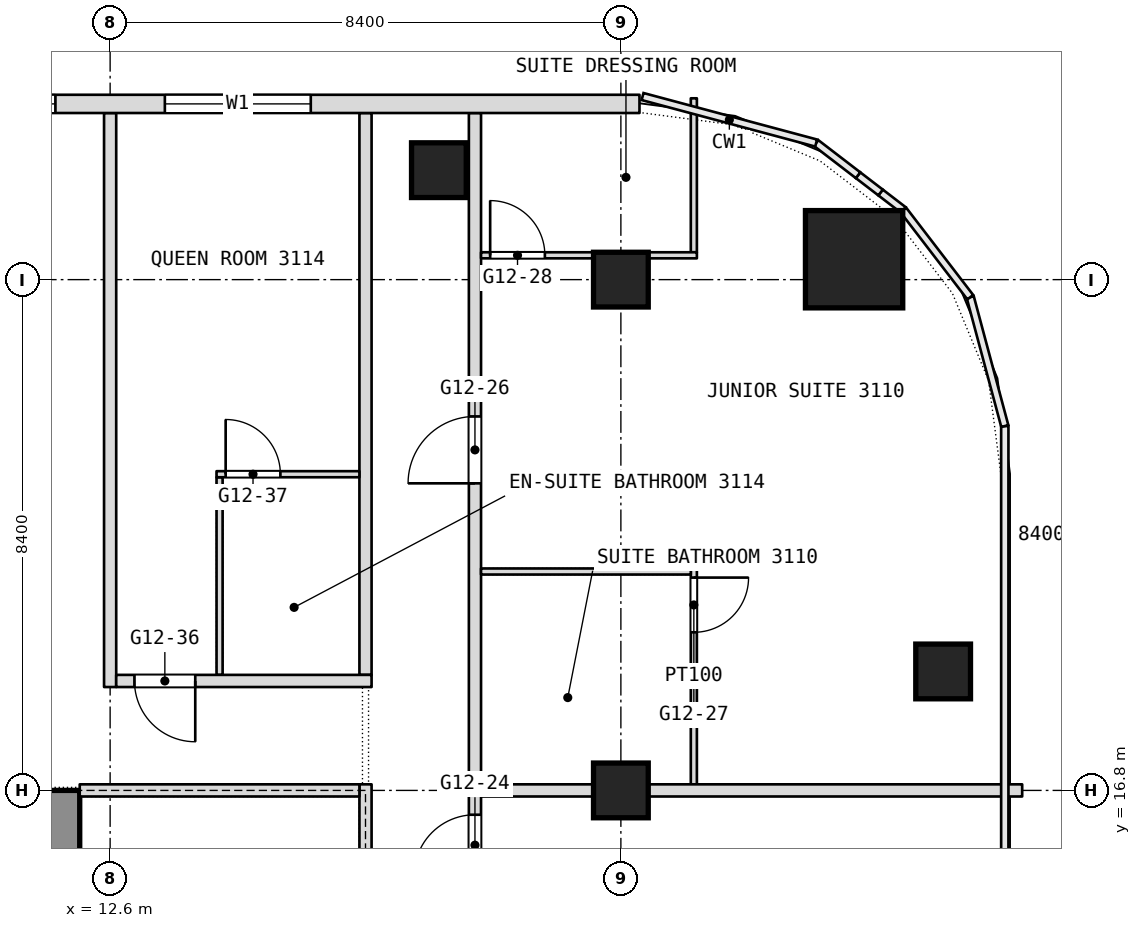
"""IFC4 building model, lengths in metres.
Left out: names, types, materials, properties, quantities, classifications, styles, units other than length and angle.
Written with IfcOpenShell. Run it as: python <this file> out.ifc"""

import sys

from ifc_helpers import new_model, si_unit, direction, frame, frame_2d, origin, origin_2d, place, context, subcontext, project, spatial, rectangle, extrude, element, fill, save


model = new_model("IFC4")
c1 = context("Model", 3, precision=1e-05, world=origin(), true_north=direction((0.0, 1.0)))
c2 = subcontext(c1, "Body", "Model", "MODEL_VIEW")
j1 = project(units=[si_unit("LENGTHUNIT", "METRE"), si_unit("PLANEANGLEUNIT", "RADIAN")], contexts=[c1])
p1 = place(None, origin())
s1 = spatial("IfcSite", under=j1, at=p1, CompositionType="ELEMENT")
p2 = place(p1, origin())
s2 = spatial("IfcBuilding", under=s1, at=p2, CompositionType="ELEMENT")
p3 = place(p2, frame((0.0, 0.0, 137.3)))
s3 = spatial("IfcBuildingStorey", under=s2, at=p3, CompositionType="ELEMENT", Elevation=137.3)
p4 = place(p3, frame((11.6, 0.0, 0.0), z_axis=(0.0, 0.0, 1.0), x_axis=(0.0, 1.0, 0.0)))
e1 = element("IfcWall", 1, at=p4, inside=s3, PredefinedType="SHEAR", context=c2, shape_type="SweptSolid", body=[
    extrude(rectangle(XDim=16.8, YDim=1.0, at=frame_2d((8.4, 0.0))), origin(), (0.0, 0.0, 1.0), 3.6),
])
p5 = place(p4, frame((2.3, 0.0, 0.0)))
e2 = element("IfcOpeningElement", 2, at=p5, cuts=e1, PredefinedType="OPENING", context=c2, shape_type="SweptSolid", body=[
    extrude(rectangle(XDim=1.1, YDim=2.1, at=frame_2d((0.55, 1.05))), frame((0.0, 0.5, 0.0), z_axis=(0.0, -1.0, 0.0), x_axis=(1.0, 0.0, 0.0)), (0.0, 0.0, 1.0), 1.0),
])
p6 = place(p4, frame((4.85, 0.0, 0.0)))
e3 = element("IfcOpeningElement", 3, at=p6, cuts=e1, PredefinedType="OPENING", context=c2, shape_type="SweptSolid", body=[
    extrude(rectangle(XDim=1.1, YDim=2.1, at=frame_2d((0.55, 1.05))), frame((0.0, 0.5, 0.0), z_axis=(0.0, -1.0, 0.0), x_axis=(1.0, 0.0, 0.0)), (0.0, 0.0, 1.0), 1.0),
])
p7 = place(p4, frame((6.825, 0.0, 0.0)))
e4 = element("IfcOpeningElement", 4, at=p7, cuts=e1, PredefinedType="OPENING", context=c2, shape_type="SweptSolid", body=[
    extrude(rectangle(XDim=1.2, YDim=2.1, at=frame_2d((0.6, 1.05))), frame((0.0, 0.5, 0.0), z_axis=(0.0, -1.0, 0.0), x_axis=(1.0, 0.0, 0.0)), (0.0, 0.0, 1.0), 1.0),
])
p8 = place(p4, frame((13.4, 0.0, 0.0)))
e5 = element("IfcOpeningElement", 5, at=p8, cuts=e1, PredefinedType="OPENING", context=c2, shape_type="SweptSolid", body=[
    extrude(rectangle(XDim=1.1, YDim=2.1, at=frame_2d((0.55, 1.05))), frame((0.0, 0.5, 0.0), z_axis=(0.0, -1.0, 0.0), x_axis=(1.0, 0.0, 0.0)), (0.0, 0.0, 1.0), 1.0),
])
p9 = place(p4, frame((10.85, 0.0, 0.0)))
e6 = element("IfcOpeningElement", 6, at=p9, cuts=e1, PredefinedType="OPENING", context=c2, shape_type="SweptSolid", body=[
    extrude(rectangle(XDim=1.1, YDim=2.1, at=frame_2d((0.55, 1.05))), frame((0.0, 0.5, 0.0), z_axis=(0.0, -1.0, 0.0), x_axis=(1.0, 0.0, 0.0)), (0.0, 0.0, 1.0), 1.0),
])
p10 = place(p4, frame((8.775, 0.0, 0.0)))
e7 = element("IfcOpeningElement", 7, at=p10, cuts=e1, PredefinedType="OPENING", context=c2, shape_type="SweptSolid", body=[
    extrude(rectangle(XDim=1.2, YDim=2.1, at=frame_2d((0.6, 1.05))), frame((0.0, 0.5, 0.0), z_axis=(0.0, -1.0, 0.0), x_axis=(1.0, 0.0, 0.0)), (0.0, 0.0, 1.0), 1.0),
])
p11 = place(p3, frame((24.835, 25.535, 0.0), z_axis=(0.0, 0.0, 1.0), x_axis=(1.0, 0.0, 0.0)))
e8 = element("IfcColumn", 8, at=p11, inside=s3, PredefinedType="COLUMN", context=c2, shape_type="SweptSolid", body=[
    extrude(rectangle(XDim=1.6, YDim=1.6, at=origin_2d()), origin(), (0.0, 0.0, 1.0), 3.6),
])
for number, where, z_axis, x_axis in (
    (9, (21.0, 16.8, 0.0), (0.0, 0.0, 1.0), (1.0, 0.0, 0.0)),
    (10, (21.0, 25.2, 0.0), (0.0, 0.0, 1.0), (1.0, 0.0, 0.0)),
    (11, (18.007, 27.0, 0.0), (0.0, 0.0, 1.0), (1.0, 0.0, 0.0)),
    (12, (26.3, 18.756, 0.0), (0.0, 0.0, 1.0), (1.0, 0.0, 0.0)),
):
    element("IfcColumn", number, at=place(p3, frame(where, z_axis=z_axis, x_axis=x_axis)), inside=s3, PredefinedType="COLUMN", context=c2, shape_type="SweptSolid", body=[
        extrude(rectangle(XDim=0.9, YDim=0.9, at=origin_2d()), origin(), (0.0, 0.0, 1.0), 3.6),
    ])
p12 = place(p3, frame((22.2, 16.9, 0.0), z_axis=(0.0, 0.0, 1.0), x_axis=(0.0, 1.0, 0.0)))
e13 = element("IfcWall", 13, at=p12, inside=s3, PredefinedType="PARTITIONING", context=c2, shape_type="SweptSolid", body=[
    extrude(rectangle(XDim=3.55, YDim=0.1, at=frame_2d((1.775, 0.0))), origin(), (0.0, 0.0, 1.0), 3.34),
])
p13 = place(p12, frame((2.5, 0.0, 0.0)))
e14 = element("IfcOpeningElement", 14, at=p13, cuts=e13, PredefinedType="OPENING", context=c2, shape_type="SweptSolid", body=[
    extrude(rectangle(XDim=0.9, YDim=2.1, at=frame_2d((0.45, 1.05))), frame((0.0, 0.05, 0.0), z_axis=(0.0, -1.0, 0.0), x_axis=(1.0, 0.0, 0.0)), (0.0, 0.0, 1.0), 0.1),
])
p14 = place(p3, frame((22.2, 25.65, 0.0), z_axis=(0.0, 0.0, 1.0), x_axis=(0.0, 1.0, 0.0)))
e15 = element("IfcWall", 15, at=p14, inside=s3, PredefinedType="PARTITIONING", context=c2, shape_type="SweptSolid", body=[
    extrude(rectangle(XDim=2.532, YDim=0.1, at=frame_2d((1.266, 0.0))), origin(), (0.0, 0.0, 1.0), 3.34),
])
p15 = place(p3, frame((18.6, -21.708, 0.0), z_axis=(0.0, 0.0, 1.0), x_axis=(0.0, 1.0, 0.0)))
e16 = element("IfcWall", 16, at=p15, inside=s3, PredefinedType="PARTITIONING", context=c2, shape_type="SweptSolid", body=[
    extrude(rectangle(XDim=49.648, YDim=0.2, at=frame_2d((24.824, 0.0))), origin(), (0.0, 0.0, 1.0), 3.34),
])
p16 = place(p15, frame((2.8, 0.0, 0.0)))
e17 = element("IfcOpeningElement", 17, at=p16, cuts=e16, PredefinedType="OPENING", context=c2, shape_type="SweptSolid", body=[
    extrude(rectangle(XDim=1.0, YDim=2.1, at=frame_2d((0.5, 1.05))), frame((0.0, 0.1, 0.0), z_axis=(0.0, -1.0, 0.0), x_axis=(1.0, 0.0, 0.0)), (0.0, 0.0, 1.0), 0.2),
])
p17 = place(p15, frame((7.708, 0.0, 0.0)))
e18 = element("IfcOpeningElement", 18, at=p17, cuts=e16, PredefinedType="OPENING", context=c2, shape_type="SweptSolid", body=[
    extrude(rectangle(XDim=1.0, YDim=2.1, at=frame_2d((0.5, 1.05))), frame((0.0, 0.1, 0.0), z_axis=(0.0, -1.0, 0.0), x_axis=(1.0, 0.0, 0.0)), (0.0, 0.0, 1.0), 0.2),
])
p18 = place(p15, frame((9.508, 0.0, 0.0)))
e19 = element("IfcOpeningElement", 19, at=p18, cuts=e16, PredefinedType="OPENING", context=c2, shape_type="SweptSolid", body=[
    extrude(rectangle(XDim=1.0, YDim=2.1, at=frame_2d((0.5, 1.05))), frame((0.0, 0.1, 0.0), z_axis=(0.0, -1.0, 0.0), x_axis=(1.0, 0.0, 0.0)), (0.0, 0.0, 1.0), 0.2),
])
p19 = place(p15, frame((13.708, 0.0, 0.0)))
e20 = element("IfcOpeningElement", 20, at=p19, cuts=e16, PredefinedType="OPENING", context=c2, shape_type="SweptSolid", body=[
    extrude(rectangle(XDim=1.0, YDim=2.1, at=frame_2d((0.5, 1.05))), frame((0.0, 0.1, 0.0), z_axis=(0.0, -1.0, 0.0), x_axis=(1.0, 0.0, 0.0)), (0.0, 0.0, 1.0), 0.2),
])
p20 = place(p15, frame((20.308, 0.0, 0.0)))
e21 = element("IfcOpeningElement", 21, at=p20, cuts=e16, PredefinedType="OPENING", context=c2, shape_type="SweptSolid", body=[
    extrude(rectangle(XDim=1.0, YDim=2.1, at=frame_2d((0.5, 1.05))), frame((0.0, 0.1, 0.0), z_axis=(0.0, -1.0, 0.0), x_axis=(1.0, 0.0, 0.0)), (0.0, 0.0, 1.0), 0.2),
])
p21 = place(p15, frame((24.508, 0.0, 0.0)))
e22 = element("IfcOpeningElement", 22, at=p21, cuts=e16, PredefinedType="OPENING", context=c2, shape_type="SweptSolid", body=[
    extrude(rectangle(XDim=1.0, YDim=2.1, at=frame_2d((0.5, 1.05))), frame((0.0, 0.1, 0.0), z_axis=(0.0, -1.0, 0.0), x_axis=(1.0, 0.0, 0.0)), (0.0, 0.0, 1.0), 0.2),
])
p22 = place(p15, frame((26.308, 0.0, 0.0)))
e23 = element("IfcOpeningElement", 23, at=p22, cuts=e16, PredefinedType="OPENING", context=c2, shape_type="SweptSolid", body=[
    extrude(rectangle(XDim=1.0, YDim=2.1, at=frame_2d((0.5, 1.05))), frame((0.0, 0.1, 0.0), z_axis=(0.0, -1.0, 0.0), x_axis=(1.0, 0.0, 0.0)), (0.0, 0.0, 1.0), 0.2),
])
p23 = place(p15, frame((30.508, 0.0, 0.0)))
e24 = element("IfcOpeningElement", 24, at=p23, cuts=e16, PredefinedType="OPENING", context=c2, shape_type="SweptSolid", body=[
    extrude(rectangle(XDim=1.0, YDim=2.1, at=frame_2d((0.5, 1.05))), frame((0.0, 0.1, 0.0), z_axis=(0.0, -1.0, 0.0), x_axis=(1.0, 0.0, 0.0)), (0.0, 0.0, 1.0), 0.2),
])
p24 = place(p15, frame((37.108, 0.0, 0.0)))
e25 = element("IfcOpeningElement", 25, at=p24, cuts=e16, PredefinedType="OPENING", context=c2, shape_type="SweptSolid", body=[
    extrude(rectangle(XDim=1.0, YDim=2.1, at=frame_2d((0.5, 1.05))), frame((0.0, 0.1, 0.0), z_axis=(0.0, -1.0, 0.0), x_axis=(1.0, 0.0, 0.0)), (0.0, 0.0, 1.0), 0.2),
])
p25 = place(p15, frame((43.558, 0.0, 0.0)))
e26 = element("IfcOpeningElement", 26, at=p25, cuts=e16, PredefinedType="OPENING", context=c2, shape_type="SweptSolid", body=[
    extrude(rectangle(XDim=1.1, YDim=2.1, at=frame_2d((0.55, 1.05))), frame((0.0, 0.1, 0.0), z_axis=(0.0, -1.0, 0.0), x_axis=(1.0, 0.0, 0.0)), (0.0, 0.0, 1.0), 0.2),
])
p26 = place(p3, frame((16.8, 18.7, 0.0), z_axis=(0.0, 0.0, 1.0), x_axis=(0.0, 1.0, 0.0)))
e27 = element("IfcWall", 27, at=p26, inside=s3, PredefinedType="PARTITIONING", context=c2, shape_type="SweptSolid", body=[
    extrude(rectangle(XDim=9.24, YDim=0.2, at=frame_2d((4.62, 0.0))), origin(), (0.0, 0.0, 1.0), 3.34),
])
p27 = place(p3, frame((14.4, 18.7, 0.0), z_axis=(0.0, 0.0, 1.0), x_axis=(0.0, 1.0, 0.0)))
e28 = element("IfcWall", 28, at=p27, inside=s3, PredefinedType="PARTITIONING", context=c2, shape_type="SweptSolid", body=[
    extrude(rectangle(XDim=3.25, YDim=0.1, at=frame_2d((1.625, 0.0))), origin(), (0.0, 0.0, 1.0), 3.34),
])
p28 = place(p3, frame((12.6, 18.5, 0.0), z_axis=(0.0, 0.0, 1.0), x_axis=(0.0, 1.0, 0.0)))
e29 = element("IfcWall", 29, at=p28, inside=s3, PredefinedType="PARTITIONING", context=c2, shape_type="SweptSolid", body=[
    extrude(rectangle(XDim=9.44, YDim=0.2, at=frame_2d((4.72, 0.0))), origin(), (0.0, 0.0, 1.0), 3.34),
])
p29 = place(p3, frame((18.7, 16.8, 0.0), z_axis=(0.0, 0.0, 1.0), x_axis=(1.0, 0.0, 0.0)))
e30 = element("IfcWall", 30, at=p29, inside=s3, PredefinedType="PARTITIONING", context=c2, shape_type="SweptSolid", body=[
    extrude(rectangle(XDim=8.9, YDim=0.2, at=frame_2d((4.45, 0.0))), origin(), (0.0, 0.0, 1.0), 2.89),
])
p30 = place(p3, frame((12.7, 18.6, 0.0), z_axis=(0.0, 0.0, 1.0), x_axis=(1.0, 0.0, 0.0)))
e31 = element("IfcWall", 31, at=p30, inside=s3, PredefinedType="PARTITIONING", context=c2, shape_type="SweptSolid", body=[
    extrude(rectangle(XDim=4.2, YDim=0.2, at=frame_2d((2.1, 0.0))), origin(), (0.0, 0.0, 1.0), 3.34),
])
p31 = place(p30, frame((0.3, 0.0, 0.0)))
e32 = element("IfcOpeningElement", 32, at=p31, cuts=e31, PredefinedType="OPENING", context=c2, shape_type="SweptSolid", body=[
    extrude(rectangle(XDim=1.0, YDim=2.1, at=frame_2d((0.5, 1.05))), frame((0.0, 0.1, 0.0), z_axis=(0.0, -1.0, 0.0), x_axis=(1.0, 0.0, 0.0)), (0.0, 0.0, 1.0), 0.2),
])
p32 = place(p3, frame((18.7, 20.4, 0.0), z_axis=(0.0, 0.0, 1.0), x_axis=(1.0, 0.0, 0.0)))
e33 = element("IfcWall", 33, at=p32, inside=s3, PredefinedType="PARTITIONING", context=c2, shape_type="SweptSolid", body=[
    extrude(rectangle(XDim=3.45, YDim=0.1, at=frame_2d((1.725, 0.0))), origin(), (0.0, 0.0, 1.0), 3.34),
])
p33 = place(p3, frame((14.35, 22.0, 0.0), z_axis=(0.0, 0.0, 1.0), x_axis=(1.0, 0.0, 0.0)))
e34 = element("IfcWall", 34, at=p33, inside=s3, PredefinedType="PARTITIONING", context=c2, shape_type="SweptSolid", body=[
    extrude(rectangle(XDim=2.35, YDim=0.1, at=frame_2d((1.175, 0.0))), origin(), (0.0, 0.0, 1.0), 3.34),
])
p34 = place(p33, frame((0.15, 0.0, 0.0)))
e35 = element("IfcOpeningElement", 35, at=p34, cuts=e34, PredefinedType="OPENING", context=c2, shape_type="SweptSolid", body=[
    extrude(rectangle(XDim=0.9, YDim=2.1, at=frame_2d((0.45, 1.05))), frame((0.0, 0.05, 0.0), z_axis=(0.0, -1.0, 0.0), x_axis=(1.0, 0.0, 0.0)), (0.0, 0.0, 1.0), 0.1),
])
p35 = place(p3, frame((18.7, 25.6, 0.0), z_axis=(0.0, 0.0, 1.0), x_axis=(1.0, 0.0, 0.0)))
e36 = element("IfcWall", 36, at=p35, inside=s3, PredefinedType="PARTITIONING", context=c2, shape_type="SweptSolid", body=[
    extrude(rectangle(XDim=3.55, YDim=0.1, at=frame_2d((1.775, 0.0))), origin(), (0.0, 0.0, 1.0), 3.34),
])
p36 = place(p35, frame((0.15, 0.0, 0.0)))
e37 = element("IfcOpeningElement", 37, at=p36, cuts=e36, PredefinedType="OPENING", context=c2, shape_type="SweptSolid", body=[
    extrude(rectangle(XDim=0.9, YDim=2.1, at=frame_2d((0.45, 1.05))), frame((0.0, 0.05, 0.0), z_axis=(0.0, -1.0, 0.0), x_axis=(1.0, 0.0, 0.0)), (0.0, 0.0, 1.0), 0.1),
])
p37 = place(p3, frame((21.306, 28.09, 0.0), z_axis=(0.0, 0.0, 1.0), x_axis=(-1.0, 0.0, 0.0)))
e38 = element("IfcWall", 38, at=p37, inside=s3, PredefinedType="NOTDEFINED", context=c2, shape_type="SweptSolid", body=[
    extrude(rectangle(XDim=42.612, YDim=0.3, at=frame_2d((21.306, 0.0))), origin(), (0.0, 0.0, 1.0), 3.6),
])
p38 = place(p37, frame((5.406, 0.0, 0.9)))
e39 = element("IfcOpeningElement", 39, at=p38, cuts=e38, PredefinedType="OPENING", context=c2, shape_type="SweptSolid", body=[
    extrude(rectangle(XDim=2.4, YDim=2.1, at=frame_2d((1.2, 1.05))), frame((0.0, 0.15, 0.0), z_axis=(0.0, -1.0, 0.0), x_axis=(1.0, 0.0, 0.0)), (0.0, 0.0, 1.0), 0.3),
])
p39 = place(p37, frame((9.606, 0.0, 0.9)))
e40 = element("IfcOpeningElement", 40, at=p39, cuts=e38, PredefinedType="OPENING", context=c2, shape_type="SweptSolid", body=[
    extrude(rectangle(XDim=2.4, YDim=2.1, at=frame_2d((1.2, 1.05))), frame((0.0, 0.15, 0.0), z_axis=(0.0, -1.0, 0.0), x_axis=(1.0, 0.0, 0.0)), (0.0, 0.0, 1.0), 0.3),
])
p40 = place(p37, frame((13.806, 0.0, 0.9)))
e41 = element("IfcOpeningElement", 41, at=p40, cuts=e38, PredefinedType="OPENING", context=c2, shape_type="SweptSolid", body=[
    extrude(rectangle(XDim=2.4, YDim=2.1, at=frame_2d((1.2, 1.05))), frame((0.0, 0.15, 0.0), z_axis=(0.0, -1.0, 0.0), x_axis=(1.0, 0.0, 0.0)), (0.0, 0.0, 1.0), 0.3),
])
p41 = place(p37, frame((18.006, 0.0, 0.9)))
e42 = element("IfcOpeningElement", 42, at=p41, cuts=e38, PredefinedType="OPENING", context=c2, shape_type="SweptSolid", body=[
    extrude(rectangle(XDim=2.4, YDim=2.1, at=frame_2d((1.2, 1.05))), frame((0.0, 0.15, 0.0), z_axis=(0.0, -1.0, 0.0), x_axis=(1.0, 0.0, 0.0)), (0.0, 0.0, 1.0), 0.3),
])
p42 = place(p37, frame((22.206, 0.0, 0.9)))
e43 = element("IfcOpeningElement", 43, at=p42, cuts=e38, PredefinedType="OPENING", context=c2, shape_type="SweptSolid", body=[
    extrude(rectangle(XDim=2.4, YDim=2.1, at=frame_2d((1.2, 1.05))), frame((0.0, 0.15, 0.0), z_axis=(0.0, -1.0, 0.0), x_axis=(1.0, 0.0, 0.0)), (0.0, 0.0, 1.0), 0.3),
])
p43 = place(p37, frame((26.406, 0.0, 0.9)))
e44 = element("IfcOpeningElement", 44, at=p43, cuts=e38, PredefinedType="OPENING", context=c2, shape_type="SweptSolid", body=[
    extrude(rectangle(XDim=2.4, YDim=2.1, at=frame_2d((1.2, 1.05))), frame((0.0, 0.15, 0.0), z_axis=(0.0, -1.0, 0.0), x_axis=(1.0, 0.0, 0.0)), (0.0, 0.0, 1.0), 0.3),
])
p44 = place(p37, frame((30.606, 0.0, 0.9)))
e45 = element("IfcOpeningElement", 45, at=p44, cuts=e38, PredefinedType="OPENING", context=c2, shape_type="SweptSolid", body=[
    extrude(rectangle(XDim=2.4, YDim=2.1, at=frame_2d((1.2, 1.05))), frame((0.0, 0.15, 0.0), z_axis=(0.0, -1.0, 0.0), x_axis=(1.0, 0.0, 0.0)), (0.0, 0.0, 1.0), 0.3),
])
p45 = place(p37, frame((34.806, 0.0, 0.9)))
e46 = element("IfcOpeningElement", 46, at=p45, cuts=e38, PredefinedType="OPENING", context=c2, shape_type="SweptSolid", body=[
    extrude(rectangle(XDim=2.4, YDim=2.1, at=frame_2d((1.2, 1.05))), frame((0.0, 0.15, 0.0), z_axis=(0.0, -1.0, 0.0), x_axis=(1.0, 0.0, 0.0)), (0.0, 0.0, 1.0), 0.3),
])
p46 = place(p3, frame((16.8, -0.1, 0.0), z_axis=(0.0, 0.0, 1.0), x_axis=(0.0, 1.0, 0.0)))
e47 = element("IfcWall", 47, at=p46, inside=s3, PredefinedType="PARTITIONING", context=c2, shape_type="SweptSolid", body=[
    extrude(rectangle(XDim=17.0, YDim=0.2, at=frame_2d((8.5, 0.0))), origin(), (0.0, 0.0, 1.0), 3.34),
])
p47 = place(p46, frame((2.2, 0.0, 0.0)))
e48 = element("IfcOpeningElement", 48, at=p47, cuts=e47, PredefinedType="OPENING", context=c2, shape_type="SweptSolid", body=[
    extrude(rectangle(XDim=1.8, YDim=2.1, at=frame_2d((0.9, 1.05))), frame((0.0, 0.1, 0.0), z_axis=(0.0, -1.0, 0.0), x_axis=(1.0, 0.0, 0.0)), (0.0, 0.0, 1.0), 0.2),
])
p48 = place(p46, frame((13.0, 0.0, 0.0)))
e49 = element("IfcOpeningElement", 49, at=p48, cuts=e47, PredefinedType="OPENING", context=c2, shape_type="SweptSolid", body=[
    extrude(rectangle(XDim=1.8, YDim=2.1, at=frame_2d((0.9, 1.05))), frame((0.0, 0.1, 0.0), z_axis=(0.0, -1.0, 0.0), x_axis=(1.0, 0.0, 0.0)), (0.0, 0.0, 1.0), 0.2),
])
p49 = place(p3, frame((12.1, 16.8, 0.0), z_axis=(0.0, 0.0, 1.0), x_axis=(1.0, 0.0, 0.0)))
e50 = element("IfcWall", 50, at=p49, inside=s3, PredefinedType="PARTITIONING", context=c2, shape_type="SweptSolid", body=[
    extrude(rectangle(XDim=4.6, YDim=0.2, at=frame_2d((2.3, 0.0))), origin(), (0.0, 0.0, 1.0), 2.89),
])
p50 = place(p13, origin())
e51 = element("IfcDoor", 51, at=p50, inside=s3, OperationType="SINGLE_SWING_RIGHT", PredefinedType="DOOR", context=c2, shape_type="SweptSolid", body=[
    extrude(rectangle(XDim=0.9, YDim=2.1, at=frame_2d((0.45, 1.05))), frame((0.0, 0.025, 0.0), z_axis=(0.0, -1.0, 0.0), x_axis=(1.0, 0.0, 0.0)), (0.0, 0.0, 1.0), 0.05),
])
fill(e14, e51)
p51 = place(p24, origin())
e52 = element("IfcDoor", 52, at=p51, inside=s3, OperationType="SINGLE_SWING_RIGHT", PredefinedType="DOOR", context=c2, shape_type="SweptSolid", body=[
    extrude(rectangle(XDim=1.0, YDim=2.1, at=frame_2d((0.5, 1.05))), frame((0.0, 0.025, 0.0), z_axis=(0.0, -1.0, 0.0), x_axis=(1.0, 0.0, 0.0)), (0.0, 0.0, 1.0), 0.05),
])
fill(e25, e52)
p52 = place(p25, origin())
e53 = element("IfcDoor", 53, at=p52, inside=s3, OperationType="SINGLE_SWING_RIGHT", PredefinedType="DOOR", context=c2, shape_type="SweptSolid", body=[
    extrude(rectangle(XDim=1.1, YDim=2.1, at=frame_2d((0.55, 1.05))), frame((0.0, 0.025, 0.0), z_axis=(0.0, -1.0, 0.0), x_axis=(1.0, 0.0, 0.0)), (0.0, 0.0, 1.0), 0.05),
])
fill(e26, e53)
p53 = place(p31, origin())
e54 = element("IfcDoor", 54, at=p53, inside=s3, OperationType="SINGLE_SWING_LEFT", PredefinedType="DOOR", context=c2, shape_type="SweptSolid", body=[
    extrude(rectangle(XDim=1.0, YDim=2.1, at=frame_2d((0.5, 1.05))), frame((0.0, 0.025, 0.0), z_axis=(0.0, -1.0, 0.0), x_axis=(1.0, 0.0, 0.0)), (0.0, 0.0, 1.0), 0.05),
])
fill(e32, e54)
p54 = place(p34, origin())
e55 = element("IfcDoor", 55, at=p54, inside=s3, OperationType="SINGLE_SWING_RIGHT", PredefinedType="DOOR", context=c2, shape_type="SweptSolid", body=[
    extrude(rectangle(XDim=0.9, YDim=2.1, at=frame_2d((0.45, 1.05))), frame((0.0, 0.025, 0.0), z_axis=(0.0, -1.0, 0.0), x_axis=(1.0, 0.0, 0.0)), (0.0, 0.0, 1.0), 0.05),
])
fill(e35, e55)
p55 = place(p36, origin())
e56 = element("IfcDoor", 56, at=p55, inside=s3, OperationType="SINGLE_SWING_LEFT", PredefinedType="DOOR", context=c2, shape_type="SweptSolid", body=[
    extrude(rectangle(XDim=0.9, YDim=2.1, at=frame_2d((0.45, 1.05))), frame((0.0, 0.025, 0.0), z_axis=(0.0, -1.0, 0.0), x_axis=(1.0, 0.0, 0.0)), (0.0, 0.0, 1.0), 0.05),
])
fill(e37, e56)
p56 = place(p38, origin())
e57 = element("IfcWindow", 57, at=p56, inside=s3, PartitioningType="SINGLE_PANEL", PredefinedType="WINDOW", context=c2, shape_type="SweptSolid", body=[
    extrude(rectangle(XDim=2.4, YDim=2.1, at=frame_2d((1.2, 1.05))), frame((0.0, 0.03, 0.0), z_axis=(0.0, -1.0, 0.0), x_axis=(1.0, 0.0, 0.0)), (0.0, 0.0, 1.0), 0.06),
])
fill(e39, e57)
p57 = place(p39, origin())
e58 = element("IfcWindow", 58, at=p57, inside=s3, PartitioningType="SINGLE_PANEL", PredefinedType="WINDOW", context=c2, shape_type="SweptSolid", body=[
    extrude(rectangle(XDim=2.4, YDim=2.1, at=frame_2d((1.2, 1.05))), frame((0.0, 0.03, 0.0), z_axis=(0.0, -1.0, 0.0), x_axis=(1.0, 0.0, 0.0)), (0.0, 0.0, 1.0), 0.06),
])
fill(e40, e58)
save(model, sys.argv[1])
